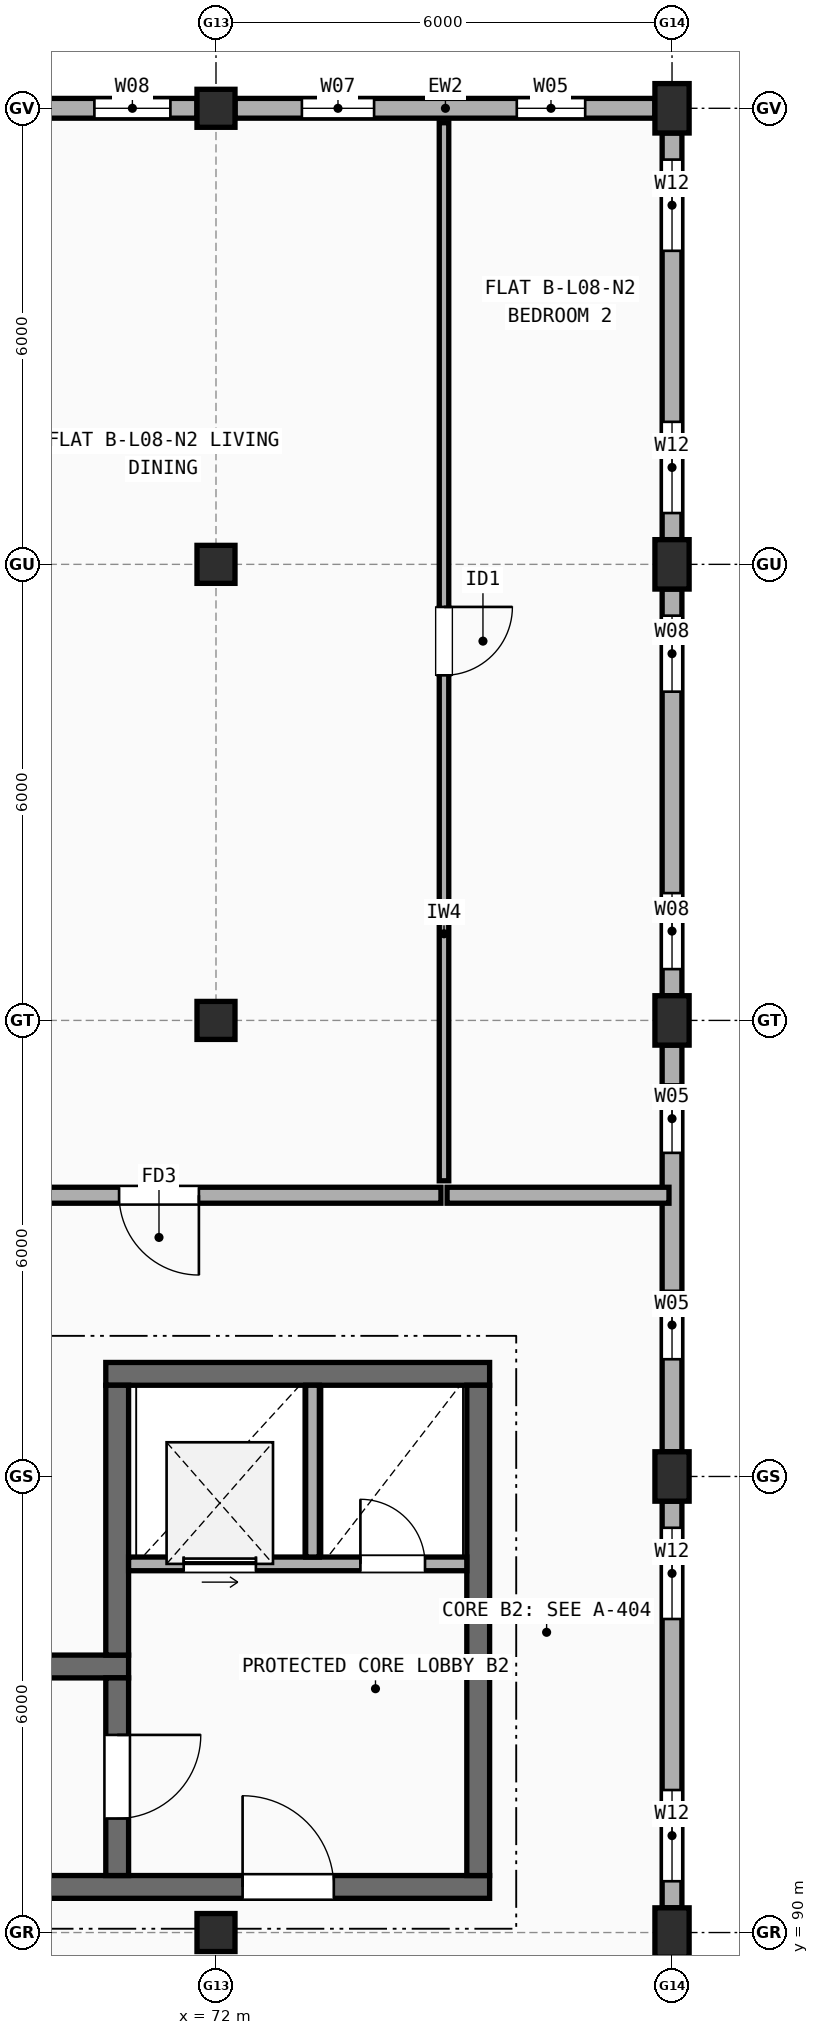
"""IFC4 building model, lengths in metres.
Left out: names, types, materials, properties, quantities, classifications, styles, units other than length and angle.
Written with IfcOpenShell. Run it as: python <this file> out.ifc"""

import sys

from ifc_helpers import new_model, si_unit, direction, frame, frame_2d, origin, origin_2d, place, context, subcontext, project, spatial, rectangle, extrude, element, fill, save


model = new_model("IFC4")
c1 = context("Model", 3, precision=1e-05, world=origin(), true_north=direction((0.0, 1.0)))
c2 = subcontext(c1, "Body", "Model", "MODEL_VIEW")
j1 = project(units=[si_unit("LENGTHUNIT", "METRE"), si_unit("PLANEANGLEUNIT", "RADIAN")], contexts=[c1])
p1 = place(None, origin())
s1 = spatial("IfcSite", under=j1, at=p1, CompositionType="ELEMENT")
p2 = place(p1, origin())
s2 = spatial("IfcBuilding", under=s1, at=p2, CompositionType="ELEMENT")
p3 = place(p2, frame((0.0, 0.0, 26.9)))
s3 = spatial("IfcBuildingStorey", under=s2, at=p3, CompositionType="ELEMENT", Elevation=26.9)
for number, where, z_axis, x_axis in (
    (1, (72.0, 90.0, 0.0), (0.0, 0.0, 1.0), (1.0, 0.0, 0.0)),
    (2, (72.0, 102.0, 0.0), (0.0, 0.0, 1.0), (1.0, 0.0, 0.0)),
    (3, (72.0, 108.0, 0.0), (0.0, 0.0, 1.0), (1.0, 0.0, 0.0)),
    (4, (72.0, 114.0, 0.0), (0.0, 0.0, 1.0), (1.0, 0.0, 0.0)),
):
    element("IfcColumn", number, at=place(p3, frame(where, z_axis=z_axis, x_axis=x_axis)), inside=s3, PredefinedType="COLUMN", context=c2, shape_type="SweptSolid", body=[
        extrude(rectangle(XDim=0.5, YDim=0.5, at=origin_2d()), origin(), (0.0, 0.0, 1.0), 2.98),
    ])
for number, where, z_axis, x_axis in (
    (5, (78.0, 90.0, 0.0), (0.0, 0.0, 1.0), (1.0, 0.0, 0.0)),
    (6, (78.0, 96.0, 0.0), (0.0, 0.0, 1.0), (1.0, 0.0, 0.0)),
    (7, (78.0, 102.0, 0.0), (0.0, 0.0, 1.0), (1.0, 0.0, 0.0)),
    (8, (78.0, 108.0, 0.0), (0.0, 0.0, 1.0), (1.0, 0.0, 0.0)),
    (9, (78.0, 114.0, 0.0), (0.0, 0.0, 1.0), (1.0, 0.0, 0.0)),
):
    element("IfcColumn", number, at=place(p3, frame(where, z_axis=z_axis, x_axis=x_axis)), inside=s3, PredefinedType="COLUMN", context=c2, shape_type="SweptSolid", body=[
        extrude(rectangle(XDim=0.45, YDim=0.65, at=origin_2d()), origin(), (0.0, 0.0, 1.0), 2.98),
    ])
p4 = place(p3, frame((78.0, 90.325, 0.0), z_axis=(0.0, 0.0, 1.0), x_axis=(0.0, 1.0, 0.0)))
e10 = element("IfcWall", 10, at=p4, inside=s3, PredefinedType="STANDARD", context=c2, shape_type="SweptSolid", body=[
    extrude(rectangle(XDim=5.35, YDim=0.26, at=frame_2d((2.675, 0.0))), origin(), (0.0, 0.0, 1.0), 2.462),
])
p5 = place(p4, frame((0.35, 0.0, 0.9)))
e11 = element("IfcOpeningElement", 11, at=p5, cuts=e10, PredefinedType="OPENING", context=c2, shape_type="SweptSolid", body=[
    extrude(rectangle(XDim=1.2, YDim=1.35, at=frame_2d((0.6, 0.675))), frame((0.0, 0.14, 0.0), z_axis=(0.0, -1.0, 0.0), x_axis=(1.0, 0.0, 0.0)), (0.0, 0.0, 1.0), 0.28),
])
p6 = place(p4, frame((3.8, 0.0, 0.9)))
e12 = element("IfcOpeningElement", 12, at=p6, cuts=e10, PredefinedType="OPENING", context=c2, shape_type="SweptSolid", body=[
    extrude(rectangle(XDim=1.2, YDim=1.35, at=frame_2d((0.6, 0.675))), frame((0.0, 0.14, 0.0), z_axis=(0.0, -1.0, 0.0), x_axis=(1.0, 0.0, 0.0)), (0.0, 0.0, 1.0), 0.28),
])
p7 = place(p3, frame((78.0, 96.325, 0.0), z_axis=(0.0, 0.0, 1.0), x_axis=(0.0, 1.0, 0.0)))
e13 = element("IfcWall", 13, at=p7, inside=s3, PredefinedType="STANDARD", context=c2, shape_type="SweptSolid", body=[
    extrude(rectangle(XDim=5.35, YDim=0.26, at=frame_2d((2.675, 0.0))), origin(), (0.0, 0.0, 1.0), 2.462),
])
p8 = place(p7, frame((1.218, 0.0, 0.9)))
e14 = element("IfcOpeningElement", 14, at=p8, cuts=e13, PredefinedType="OPENING", context=c2, shape_type="SweptSolid", body=[
    extrude(rectangle(XDim=0.9, YDim=1.4, at=frame_2d((0.45, 0.7))), frame((0.0, 0.14, 0.0), z_axis=(0.0, -1.0, 0.0), x_axis=(1.0, 0.0, 0.0)), (0.0, 0.0, 1.0), 0.28),
])
p9 = place(p7, frame((3.933, 0.0, 0.9)))
e15 = element("IfcOpeningElement", 15, at=p9, cuts=e13, PredefinedType="OPENING", context=c2, shape_type="SweptSolid", body=[
    extrude(rectangle(XDim=0.9, YDim=1.4, at=frame_2d((0.45, 0.7))), frame((0.0, 0.14, 0.0), z_axis=(0.0, -1.0, 0.0), x_axis=(1.0, 0.0, 0.0)), (0.0, 0.0, 1.0), 0.28),
])
p10 = place(p3, frame((78.0, 102.325, 0.0), z_axis=(0.0, 0.0, 1.0), x_axis=(0.0, 1.0, 0.0)))
e16 = element("IfcWall", 16, at=p10, inside=s3, PredefinedType="STANDARD", context=c2, shape_type="SweptSolid", body=[
    extrude(rectangle(XDim=5.35, YDim=0.26, at=frame_2d((2.675, 0.0))), origin(), (0.0, 0.0, 1.0), 2.462),
])
p11 = place(p10, frame((0.35, 0.0, 0.9)))
e17 = element("IfcOpeningElement", 17, at=p11, cuts=e16, PredefinedType="OPENING", context=c2, shape_type="SweptSolid", body=[
    extrude(rectangle(XDim=1.0, YDim=1.4, at=frame_2d((0.5, 0.7))), frame((0.0, 0.14, 0.0), z_axis=(0.0, -1.0, 0.0), x_axis=(1.0, 0.0, 0.0)), (0.0, 0.0, 1.0), 0.28),
])
p12 = place(p10, frame((4.0, 0.0, 0.9)))
e18 = element("IfcOpeningElement", 18, at=p12, cuts=e16, PredefinedType="OPENING", context=c2, shape_type="SweptSolid", body=[
    extrude(rectangle(XDim=1.0, YDim=1.4, at=frame_2d((0.5, 0.7))), frame((0.0, 0.14, 0.0), z_axis=(0.0, -1.0, 0.0), x_axis=(1.0, 0.0, 0.0)), (0.0, 0.0, 1.0), 0.28),
])
p13 = place(p3, frame((78.0, 108.325, 0.0), z_axis=(0.0, 0.0, 1.0), x_axis=(0.0, 1.0, 0.0)))
e19 = element("IfcWall", 19, at=p13, inside=s3, PredefinedType="STANDARD", context=c2, shape_type="SweptSolid", body=[
    extrude(rectangle(XDim=5.35, YDim=0.26, at=frame_2d((2.675, 0.0))), origin(), (0.0, 0.0, 1.0), 2.462),
])
p14 = place(p13, frame((0.35, 0.0, 0.9)))
e20 = element("IfcOpeningElement", 20, at=p14, cuts=e19, PredefinedType="OPENING", context=c2, shape_type="SweptSolid", body=[
    extrude(rectangle(XDim=1.2, YDim=1.35, at=frame_2d((0.6, 0.675))), frame((0.0, 0.14, 0.0), z_axis=(0.0, -1.0, 0.0), x_axis=(1.0, 0.0, 0.0)), (0.0, 0.0, 1.0), 0.28),
])
p15 = place(p13, frame((3.8, 0.0, 0.9)))
e21 = element("IfcOpeningElement", 21, at=p15, cuts=e19, PredefinedType="OPENING", context=c2, shape_type="SweptSolid", body=[
    extrude(rectangle(XDim=1.2, YDim=1.35, at=frame_2d((0.6, 0.675))), frame((0.0, 0.14, 0.0), z_axis=(0.0, -1.0, 0.0), x_axis=(1.0, 0.0, 0.0)), (0.0, 0.0, 1.0), 0.28),
])
p16 = place(p3, frame((77.775, 114.0, 0.0), z_axis=(0.0, 0.0, 1.0), x_axis=(-1.0, 0.0, 0.0)))
e22 = element("IfcWall", 22, at=p16, inside=s3, PredefinedType="STANDARD", context=c2, shape_type="SweptSolid", body=[
    extrude(rectangle(XDim=5.525, YDim=0.26, at=frame_2d((2.762, 0.0))), origin(), (0.0, 0.0, 1.0), 2.462),
])
p17 = place(p16, frame((0.917, 0.0, 0.9)))
e23 = element("IfcOpeningElement", 23, at=p17, cuts=e22, PredefinedType="OPENING", context=c2, shape_type="SweptSolid", body=[
    extrude(rectangle(XDim=0.9, YDim=1.4, at=frame_2d((0.45, 0.7))), frame((0.0, 0.14, 0.0), z_axis=(0.0, -1.0, 0.0), x_axis=(1.0, 0.0, 0.0)), (0.0, 0.0, 1.0), 0.28),
])
p18 = place(p16, frame((3.695, 0.0, 0.9)))
e24 = element("IfcOpeningElement", 24, at=p18, cuts=e22, PredefinedType="OPENING", context=c2, shape_type="SweptSolid", body=[
    extrude(rectangle(XDim=0.95, YDim=1.35, at=frame_2d((0.475, 0.675))), frame((0.0, 0.14, 0.0), z_axis=(0.0, -1.0, 0.0), x_axis=(1.0, 0.0, 0.0)), (0.0, 0.0, 1.0), 0.28),
])
p19 = place(p3, frame((71.75, 114.0, 0.0), z_axis=(0.0, 0.0, 1.0), x_axis=(-1.0, 0.0, 0.0)))
e25 = element("IfcWall", 25, at=p19, inside=s3, PredefinedType="STANDARD", context=c2, shape_type="SweptSolid", body=[
    extrude(rectangle(XDim=5.5, YDim=0.26, at=frame_2d((2.75, 0.0))), origin(), (0.0, 0.0, 1.0), 2.462),
])
p20 = place(p19, frame((0.35, 0.0, 0.9)))
e26 = element("IfcOpeningElement", 26, at=p20, cuts=e25, PredefinedType="OPENING", context=c2, shape_type="SweptSolid", body=[
    extrude(rectangle(XDim=1.0, YDim=1.4, at=frame_2d((0.5, 0.7))), frame((0.0, 0.14, 0.0), z_axis=(0.0, -1.0, 0.0), x_axis=(1.0, 0.0, 0.0)), (0.0, 0.0, 1.0), 0.28),
])
p21 = place(p19, frame((2.86, 0.0, 0.9)))
e27 = element("IfcOpeningElement", 27, at=p21, cuts=e25, PredefinedType="OPENING", context=c2, shape_type="SweptSolid", body=[
    extrude(rectangle(XDim=1.0, YDim=1.4, at=frame_2d((0.5, 0.7))), frame((0.0, 0.14, 0.0), z_axis=(0.0, -1.0, 0.0), x_axis=(1.0, 0.0, 0.0)), (0.0, 0.0, 1.0), 0.28),
])
p22 = place(p3, frame((64.25, 90.6, 0.0), z_axis=(0.0, 0.0, 1.0), x_axis=(1.0, 0.0, 0.0)))
e28 = element("IfcWall", 28, at=p22, inside=s3, PredefinedType="SHEAR", context=c2, shape_type="SweptSolid", body=[
    extrude(rectangle(XDim=11.35, YDim=0.3, at=frame_2d((5.675, 0.0))), origin(), (0.0, 0.0, 1.0), 2.98),
])
p23 = place(p22, frame((8.1, 0.0, 0.0)))
e29 = element("IfcOpeningElement", 29, at=p23, cuts=e28, PredefinedType="OPENING", context=c2, shape_type="SweptSolid", body=[
    extrude(rectangle(XDim=1.2, YDim=2.15, at=frame_2d((0.6, 1.075))), frame((0.0, 0.16, 0.0), z_axis=(0.0, -1.0, 0.0), x_axis=(1.0, 0.0, 0.0)), (0.0, 0.0, 1.0), 0.32),
])
p24 = place(p3, frame((70.85, 93.5, 0.0), z_axis=(0.0, 0.0, 1.0), x_axis=(-1.0, 0.0, 0.0)))
e30 = element("IfcWall", 30, at=p24, inside=s3, PredefinedType="SHEAR", context=c2, shape_type="SweptSolid", body=[
    extrude(rectangle(XDim=6.6, YDim=0.3, at=frame_2d((3.3, 0.0))), origin(), (0.0, 0.0, 1.0), 2.98),
])
p25 = place(p3, frame((70.7, 90.75, 0.0), z_axis=(0.0, 0.0, 1.0), x_axis=(0.0, 1.0, 0.0)))
e31 = element("IfcWall", 31, at=p25, inside=s3, PredefinedType="SHEAR", context=c2, shape_type="SweptSolid", body=[
    extrude(rectangle(XDim=2.6, YDim=0.3, at=frame_2d((1.3, 0.0))), origin(), (0.0, 0.0, 1.0), 2.98),
])
p26 = place(p25, frame((0.75, 0.0, 0.0)))
e32 = element("IfcOpeningElement", 32, at=p26, cuts=e31, PredefinedType="OPENING", context=c2, shape_type="SweptSolid", body=[
    extrude(rectangle(XDim=1.1, YDim=2.15, at=frame_2d((0.55, 1.075))), frame((0.0, 0.16, 0.0), z_axis=(0.0, -1.0, 0.0), x_axis=(1.0, 0.0, 0.0)), (0.0, 0.0, 1.0), 0.32),
])
p27 = place(p3, frame((75.6, 97.35, 0.0), z_axis=(0.0, 0.0, 1.0), x_axis=(-1.0, 0.0, 0.0)))
e33 = element("IfcWall", 33, at=p27, inside=s3, PredefinedType="SHEAR", context=c2, shape_type="SweptSolid", body=[
    extrude(rectangle(XDim=5.05, YDim=0.3, at=frame_2d((2.525, 0.0))), origin(), (0.0, 0.0, 1.0), 2.98),
])
p28 = place(p3, frame((75.45, 90.75, 0.0), z_axis=(0.0, 0.0, 1.0), x_axis=(0.0, 1.0, 0.0)))
e34 = element("IfcWall", 34, at=p28, inside=s3, PredefinedType="SHEAR", context=c2, shape_type="SweptSolid", body=[
    extrude(rectangle(XDim=6.45, YDim=0.3, at=frame_2d((3.225, 0.0))), origin(), (0.0, 0.0, 1.0), 2.98),
])
p29 = place(p3, frame((70.7, 93.65, 0.0), z_axis=(0.0, 0.0, 1.0), x_axis=(0.0, 1.0, 0.0)))
e35 = element("IfcWall", 35, at=p29, inside=s3, PredefinedType="SHEAR", context=c2, shape_type="SweptSolid", body=[
    extrude(rectangle(XDim=3.55, YDim=0.3, at=frame_2d((1.775, 0.0))), origin(), (0.0, 0.0, 1.0), 2.98),
])
p30 = place(p3, frame((70.85, 94.85, 0.0), z_axis=(0.0, 0.0, 1.0), x_axis=(1.0, 0.0, 0.0)))
e36 = element("IfcWall", 36, at=p30, inside=s3, PredefinedType="SOLIDWALL", context=c2, shape_type="SweptSolid", body=[
    extrude(rectangle(XDim=4.45, YDim=0.18, at=frame_2d((2.225, 0.0))), origin(), (0.0, 0.0, 1.0), 2.98),
])
p31 = place(p30, frame((0.725, 0.0, 0.0)))
e37 = element("IfcOpeningElement", 37, at=p31, cuts=e36, PredefinedType="OPENING", context=c2, shape_type="SweptSolid", body=[
    extrude(rectangle(XDim=0.95, YDim=2.15, at=frame_2d((0.475, 1.075))), frame((0.0, 0.1, 0.0), z_axis=(0.0, -1.0, 0.0), x_axis=(1.0, 0.0, 0.0)), (0.0, 0.0, 1.0), 0.2),
])
p32 = place(p30, frame((3.05, 0.0, 0.0)))
e38 = element("IfcOpeningElement", 38, at=p32, cuts=e36, PredefinedType="OPENING", context=c2, shape_type="SweptSolid", body=[
    extrude(rectangle(XDim=0.85, YDim=2.1, at=frame_2d((0.425, 1.05))), frame((0.0, 0.1, 0.0), z_axis=(0.0, -1.0, 0.0), x_axis=(1.0, 0.0, 0.0)), (0.0, 0.0, 1.0), 0.2),
])
p33 = place(p3, frame((73.27, 94.94, 0.0), z_axis=(0.0, 0.0, 1.0), x_axis=(0.0, 1.0, 0.0)))
e39 = element("IfcWall", 39, at=p33, inside=s3, PredefinedType="SOLIDWALL", context=c2, shape_type="SweptSolid", body=[
    extrude(rectangle(XDim=2.26, YDim=0.18, at=frame_2d((1.13, 0.0))), origin(), (0.0, 0.0, 1.0), 2.98),
])
p34 = place(p3, frame((67.54, 99.7, 0.0), z_axis=(0.0, 0.0, 1.0), x_axis=(1.0, 0.0, 0.0)))
e40 = element("IfcWall", 40, at=p34, inside=s3, PredefinedType="SOLIDWALL", context=c2, shape_type="SweptSolid", body=[
    extrude(rectangle(XDim=7.42, YDim=0.21, at=frame_2d((3.71, 0.0))), origin(), (0.0, 0.0, 1.0), 2.98),
])
p35 = place(p34, frame((3.185, 0.0, 0.0)))
e41 = element("IfcOpeningElement", 41, at=p35, cuts=e40, PredefinedType="OPENING", context=c2, shape_type="SweptSolid", body=[
    extrude(rectangle(XDim=1.05, YDim=2.15, at=frame_2d((0.525, 1.075))), frame((0.0, 0.115, 0.0), z_axis=(0.0, -1.0, 0.0), x_axis=(1.0, 0.0, 0.0)), (0.0, 0.0, 1.0), 0.23),
])
p36 = place(p3, frame((75.04, 99.7, 0.0), z_axis=(0.0, 0.0, 1.0), x_axis=(1.0, 0.0, 0.0)))
e42 = element("IfcWall", 42, at=p36, inside=s3, PredefinedType="SOLIDWALL", context=c2, shape_type="SweptSolid", body=[
    extrude(rectangle(XDim=2.92, YDim=0.21, at=frame_2d((1.46, 0.0))), origin(), (0.0, 0.0, 1.0), 2.462),
])
p37 = place(p3, frame((75.0, 99.89, 0.0), z_axis=(0.0, 0.0, 1.0), x_axis=(0.0, 1.0, 0.0)))
e43 = element("IfcWall", 43, at=p37, inside=s3, PredefinedType="PARTITIONING", context=c2, shape_type="SweptSolid", body=[
    extrude(rectangle(XDim=13.92, YDim=0.125, at=frame_2d((6.96, 0.0))), origin(), (0.0, 0.0, 1.0), 2.462),
])
p38 = place(p37, frame((6.65, 0.0, 0.0)))
e44 = element("IfcOpeningElement", 44, at=p38, cuts=e43, PredefinedType="OPENING", context=c2, shape_type="SweptSolid", body=[
    extrude(rectangle(XDim=0.9, YDim=2.1, at=frame_2d((0.45, 1.05))), frame((0.0, 0.073, 0.0), z_axis=(0.0, -1.0, 0.0), x_axis=(1.0, 0.0, 0.0)), (0.0, 0.0, 1.0), 0.145),
])
p39 = place(p5, origin())
e45 = element("IfcWindow", 45, at=p39, inside=s3, PartitioningType="SINGLE_PANEL", PredefinedType="WINDOW", context=c2, shape_type="SweptSolid", body=[
    extrude(rectangle(XDim=1.2, YDim=1.35, at=frame_2d((0.6, 0.675))), frame((0.0, 0.03, 0.0), z_axis=(0.0, -1.0, 0.0), x_axis=(1.0, 0.0, 0.0)), (0.0, 0.0, 1.0), 0.06),
])
fill(e11, e45)
p40 = place(p6, origin())
e46 = element("IfcWindow", 46, at=p40, inside=s3, PartitioningType="SINGLE_PANEL", PredefinedType="WINDOW", context=c2, shape_type="SweptSolid", body=[
    extrude(rectangle(XDim=1.2, YDim=1.35, at=frame_2d((0.6, 0.675))), frame((0.0, 0.03, 0.0), z_axis=(0.0, -1.0, 0.0), x_axis=(1.0, 0.0, 0.0)), (0.0, 0.0, 1.0), 0.06),
])
fill(e12, e46)
p41 = place(p8, origin())
e47 = element("IfcWindow", 47, at=p41, inside=s3, PartitioningType="SINGLE_PANEL", PredefinedType="WINDOW", context=c2, shape_type="SweptSolid", body=[
    extrude(rectangle(XDim=0.9, YDim=1.4, at=frame_2d((0.45, 0.7))), frame((0.0, 0.03, 0.0), z_axis=(0.0, -1.0, 0.0), x_axis=(1.0, 0.0, 0.0)), (0.0, 0.0, 1.0), 0.06),
])
fill(e14, e47)
p42 = place(p9, origin())
e48 = element("IfcWindow", 48, at=p42, inside=s3, PartitioningType="SINGLE_PANEL", PredefinedType="WINDOW", context=c2, shape_type="SweptSolid", body=[
    extrude(rectangle(XDim=0.9, YDim=1.4, at=frame_2d((0.45, 0.7))), frame((0.0, 0.03, 0.0), z_axis=(0.0, -1.0, 0.0), x_axis=(1.0, 0.0, 0.0)), (0.0, 0.0, 1.0), 0.06),
])
fill(e15, e48)
p43 = place(p11, origin())
e49 = element("IfcWindow", 49, at=p43, inside=s3, PartitioningType="SINGLE_PANEL", PredefinedType="WINDOW", context=c2, shape_type="SweptSolid", body=[
    extrude(rectangle(XDim=1.0, YDim=1.4, at=frame_2d((0.5, 0.7))), frame((0.0, 0.03, 0.0), z_axis=(0.0, -1.0, 0.0), x_axis=(1.0, 0.0, 0.0)), (0.0, 0.0, 1.0), 0.06),
])
fill(e17, e49)
p44 = place(p12, origin())
e50 = element("IfcWindow", 50, at=p44, inside=s3, PartitioningType="SINGLE_PANEL", PredefinedType="WINDOW", context=c2, shape_type="SweptSolid", body=[
    extrude(rectangle(XDim=1.0, YDim=1.4, at=frame_2d((0.5, 0.7))), frame((0.0, 0.03, 0.0), z_axis=(0.0, -1.0, 0.0), x_axis=(1.0, 0.0, 0.0)), (0.0, 0.0, 1.0), 0.06),
])
fill(e18, e50)
p45 = place(p14, origin())
e51 = element("IfcWindow", 51, at=p45, inside=s3, PartitioningType="SINGLE_PANEL", PredefinedType="WINDOW", context=c2, shape_type="SweptSolid", body=[
    extrude(rectangle(XDim=1.2, YDim=1.35, at=frame_2d((0.6, 0.675))), frame((0.0, 0.03, 0.0), z_axis=(0.0, -1.0, 0.0), x_axis=(1.0, 0.0, 0.0)), (0.0, 0.0, 1.0), 0.06),
])
fill(e20, e51)
p46 = place(p15, origin())
e52 = element("IfcWindow", 52, at=p46, inside=s3, PartitioningType="SINGLE_PANEL", PredefinedType="WINDOW", context=c2, shape_type="SweptSolid", body=[
    extrude(rectangle(XDim=1.2, YDim=1.35, at=frame_2d((0.6, 0.675))), frame((0.0, 0.03, 0.0), z_axis=(0.0, -1.0, 0.0), x_axis=(1.0, 0.0, 0.0)), (0.0, 0.0, 1.0), 0.06),
])
fill(e21, e52)
p47 = place(p17, origin())
e53 = element("IfcWindow", 53, at=p47, inside=s3, PartitioningType="SINGLE_PANEL", PredefinedType="WINDOW", context=c2, shape_type="SweptSolid", body=[
    extrude(rectangle(XDim=0.9, YDim=1.4, at=frame_2d((0.45, 0.7))), frame((0.0, 0.03, 0.0), z_axis=(0.0, -1.0, 0.0), x_axis=(1.0, 0.0, 0.0)), (0.0, 0.0, 1.0), 0.06),
])
fill(e23, e53)
p48 = place(p18, origin())
e54 = element("IfcWindow", 54, at=p48, inside=s3, PartitioningType="SINGLE_PANEL", PredefinedType="WINDOW", context=c2, shape_type="SweptSolid", body=[
    extrude(rectangle(XDim=0.95, YDim=1.35, at=frame_2d((0.475, 0.675))), frame((0.0, 0.03, 0.0), z_axis=(0.0, -1.0, 0.0), x_axis=(1.0, 0.0, 0.0)), (0.0, 0.0, 1.0), 0.06),
])
fill(e24, e54)
p49 = place(p20, origin())
e55 = element("IfcWindow", 55, at=p49, inside=s3, PartitioningType="SINGLE_PANEL", PredefinedType="WINDOW", context=c2, shape_type="SweptSolid", body=[
    extrude(rectangle(XDim=1.0, YDim=1.4, at=frame_2d((0.5, 0.7))), frame((0.0, 0.03, 0.0), z_axis=(0.0, -1.0, 0.0), x_axis=(1.0, 0.0, 0.0)), (0.0, 0.0, 1.0), 0.06),
])
fill(e26, e55)
p50 = place(p23, origin())
e56 = element("IfcDoor", 56, at=p50, inside=s3, OperationType="SINGLE_SWING_LEFT", PredefinedType="DOOR", context=c2, shape_type="SweptSolid", body=[
    extrude(rectangle(XDim=1.2, YDim=2.15, at=frame_2d((0.6, 1.075))), frame((0.0, 0.025, 0.0), z_axis=(0.0, -1.0, 0.0), x_axis=(1.0, 0.0, 0.0)), (0.0, 0.0, 1.0), 0.05),
])
fill(e29, e56)
p51 = place(p26, origin())
e57 = element("IfcDoor", 57, at=p51, inside=s3, OperationType="SINGLE_SWING_RIGHT", PredefinedType="DOOR", context=c2, shape_type="SweptSolid", body=[
    extrude(rectangle(XDim=1.1, YDim=2.15, at=frame_2d((0.55, 1.075))), frame((0.0, 0.025, 0.0), z_axis=(0.0, -1.0, 0.0), x_axis=(1.0, 0.0, 0.0)), (0.0, 0.0, 1.0), 0.05),
])
fill(e32, e57)
p52 = place(p31, origin())
e58 = element("IfcDoor", 58, at=p52, inside=s3, OperationType="SLIDING_TO_LEFT", PredefinedType="DOOR", context=c2, shape_type="SweptSolid", body=[
    extrude(rectangle(XDim=0.95, YDim=2.15, at=frame_2d((0.475, 1.075))), frame((0.0, 0.025, 0.0), z_axis=(0.0, -1.0, 0.0), x_axis=(1.0, 0.0, 0.0)), (0.0, 0.0, 1.0), 0.05),
])
fill(e37, e58)
p53 = place(p32, frame((0.85, 0.0, 0.0), z_axis=(0.0, 0.0, 1.0), x_axis=(-1.0, 0.0, 0.0)))
e59 = element("IfcDoor", 59, at=p53, inside=s3, OperationType="SINGLE_SWING_LEFT", PredefinedType="DOOR", context=c2, shape_type="SweptSolid", body=[
    extrude(rectangle(XDim=0.85, YDim=2.1, at=frame_2d((0.425, 1.05))), frame((0.0, 0.025, 0.0), z_axis=(0.0, -1.0, 0.0), x_axis=(1.0, 0.0, 0.0)), (0.0, 0.0, 1.0), 0.05),
])
fill(e38, e59)
p54 = place(p35, origin())
e60 = element("IfcDoor", 60, at=p54, inside=s3, OperationType="SINGLE_SWING_RIGHT", PredefinedType="DOOR", context=c2, shape_type="SweptSolid", body=[
    extrude(rectangle(XDim=1.05, YDim=2.15, at=frame_2d((0.525, 1.075))), frame((0.0, 0.025, 0.0), z_axis=(0.0, -1.0, 0.0), x_axis=(1.0, 0.0, 0.0)), (0.0, 0.0, 1.0), 0.05),
])
fill(e41, e60)
p55 = place(p38, origin())
e61 = element("IfcDoor", 61, at=p55, inside=s3, OperationType="SINGLE_SWING_RIGHT", PredefinedType="DOOR", context=c2, shape_type="SweptSolid", body=[
    extrude(rectangle(XDim=0.9, YDim=2.1, at=frame_2d((0.45, 1.05))), frame((0.0, 0.025, 0.0), z_axis=(0.0, -1.0, 0.0), x_axis=(1.0, 0.0, 0.0)), (0.0, 0.0, 1.0), 0.05),
])
fill(e44, e61)
save(model, sys.argv[1])
